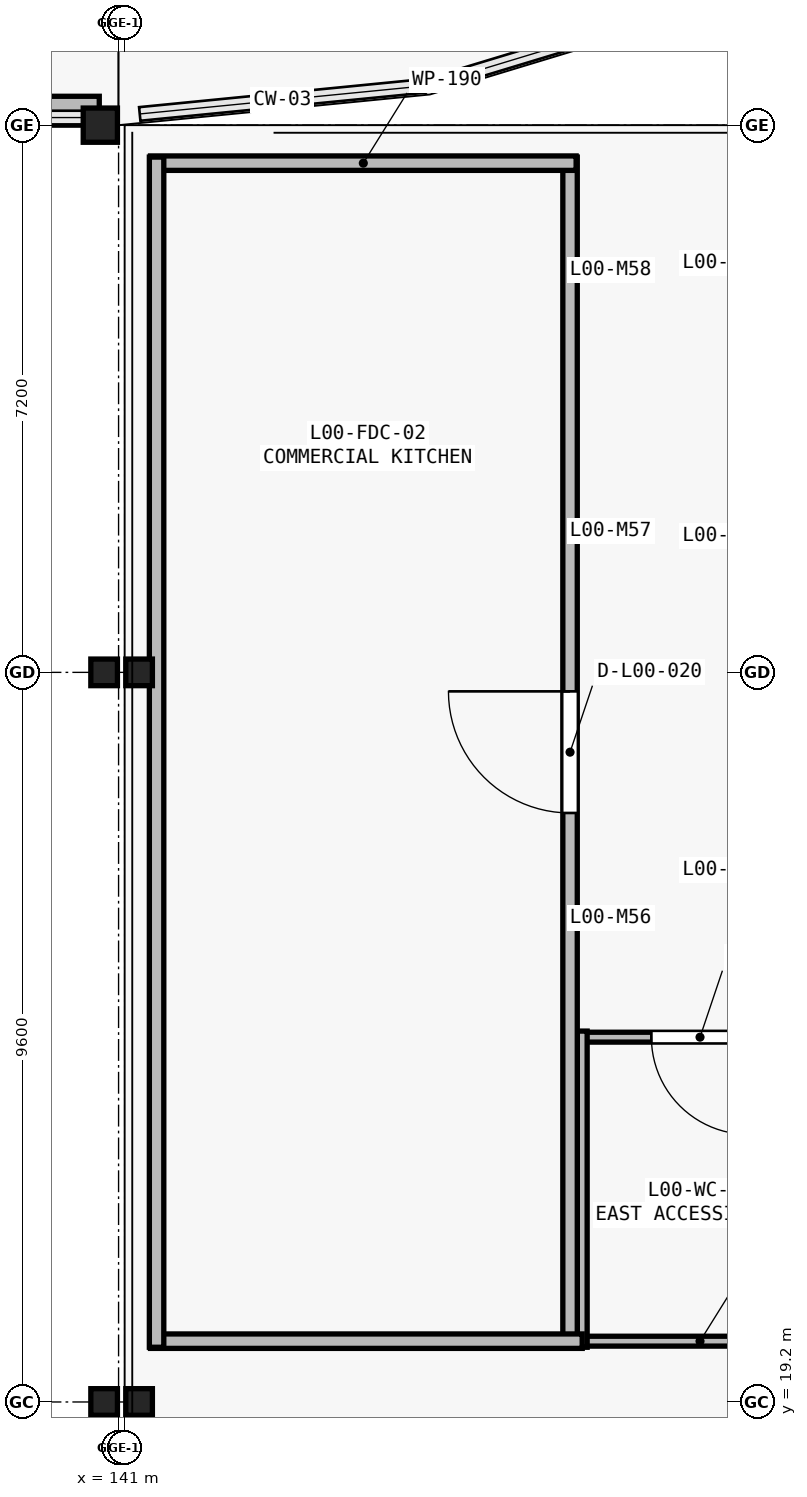
"""IFC4 building model, lengths in metres.
Left out: names, types, materials, properties, quantities, classifications, styles, units other than length and angle.
Written with IfcOpenShell. Run it as: python <this file> out.ifc"""

import sys

from ifc_helpers import new_model, si_unit, direction, frame, frame_2d, origin, origin_2d, place, context, subcontext, project, spatial, rectangle, i_section, extrude, element, fill, save


model = new_model("IFC4")
c1 = context("Model", 3, precision=1e-05, world=origin(), true_north=direction((0.0, 1.0)))
c2 = subcontext(c1, "Body", "Model", "MODEL_VIEW")
j1 = project(units=[si_unit("LENGTHUNIT", "METRE"), si_unit("PLANEANGLEUNIT", "RADIAN")], contexts=[c1])
p1 = place(None, origin())
s1 = spatial("IfcSite", under=j1, at=p1, CompositionType="ELEMENT")
p2 = place(p1, origin())
s2 = spatial("IfcBuilding", under=s1, at=p2, CompositionType="ELEMENT")
p3 = place(p2, origin())
s3 = spatial("IfcBuildingStorey", under=s2, at=p3, CompositionType="ELEMENT", Elevation=0.0)
for number, where, z_axis, x_axis in (
    (1, (140.81, 19.2, 0.0), (0.0, 0.0, 1.0), (1.0, 0.0, 0.0)),
    (2, (140.81, 28.8, 0.0), (0.0, 0.0, 1.0), (1.0, 0.0, 0.0)),
):
    element("IfcColumn", number, at=place(p3, frame(where, z_axis=z_axis, x_axis=x_axis)), inside=s3, PredefinedType="COLUMN", context=c2, shape_type="SweptSolid", body=[
        extrude(i_section(OverallWidth=0.35, OverallDepth=0.35, WebThickness=0.012, FlangeThickness=0.019, FilletRadius=0.02, at=origin_2d()), origin(), (0.0, 0.0, 1.0), 6.0),
    ])
p4 = place(p3, frame((140.76, 36.0, 0.0), z_axis=(0.0, 0.0, 1.0), x_axis=(1.0, 0.0, 0.0)))
e3 = element("IfcColumn", 3, at=p4, inside=s3, PredefinedType="COLUMN", context=c2, shape_type="SweptSolid", body=[
    extrude(i_section(OverallWidth=0.45, OverallDepth=0.45, WebThickness=0.014, FlangeThickness=0.024, FilletRadius=0.024, at=origin_2d()), origin(), (0.0, 0.0, 1.0), 6.0),
])
for number, where, z_axis, x_axis in (
    (4, (141.27, 19.2, 0.0), (0.0, 0.0, 1.0), (1.0, 0.0, 0.0)),
    (5, (141.27, 28.8, 0.0), (0.0, 0.0, 1.0), (1.0, 0.0, 0.0)),
):
    element("IfcColumn", number, at=place(p3, frame(where, z_axis=z_axis, x_axis=x_axis)), inside=s3, PredefinedType="COLUMN", context=c2, shape_type="SweptSolid", body=[
        extrude(i_section(OverallWidth=0.35, OverallDepth=0.35, WebThickness=0.012, FlangeThickness=0.019, FilletRadius=0.02, at=origin_2d()), origin(), (0.0, 0.0, 1.0), 6.0),
    ])
p5 = place(p3, frame((140.746, 36.19, 0.0), z_axis=(0.0, 0.0, 1.0), x_axis=(-1.0, 0.0, 0.0)))
e6 = element("IfcWall", 6, at=p5, inside=s3, PredefinedType="SOLIDWALL", context=c2, shape_type="SweptSolid", body=[
    extrude(rectangle(XDim=9.332, YDim=0.38, at=frame_2d((4.666, 0.0))), origin(), (0.0, 0.0, 1.0), 3.2),
])
p6 = place(p5, frame((3.646, 0.0, 0.0)))
e7 = element("IfcOpeningElement", 7, at=p6, cuts=e6, PredefinedType="OPENING", context=c2, shape_type="SweptSolid", body=[
    extrude(rectangle(XDim=2.0, YDim=2.2, at=frame_2d((1.0, 1.1))), frame((0.0, 0.2, 0.0), z_axis=(0.0, -1.0, 0.0), x_axis=(1.0, 0.0, 0.0)), (0.0, 0.0, 1.0), 0.4),
])
p7 = place(p5, frame((0.846, 0.0, 0.85)))
e8 = element("IfcOpeningElement", 8, at=p7, cuts=e6, PredefinedType="OPENING", context=c2, shape_type="SweptSolid", body=[
    extrude(rectangle(XDim=1.5, YDim=1.8, at=frame_2d((0.75, 0.9))), frame((0.0, 0.2, 0.0), z_axis=(0.0, -1.0, 0.0), x_axis=(1.0, 0.0, 0.0)), (0.0, 0.0, 1.0), 0.4),
])
p8 = place(p3, frame((150.28, 24.0, 0.0), z_axis=(0.0, 0.0, 1.0), x_axis=(-1.0, 0.0, 0.0)))
e9 = element("IfcWall", 9, at=p8, inside=s3, PredefinedType="PARTITIONING", context=c2, shape_type="SweptSolid", body=[
    extrude(rectangle(XDim=3.26, YDim=0.13, at=frame_2d((1.63, 0.0))), origin(), (0.0, 0.0, 1.0), 5.52),
])
p9 = place(p8, frame((0.99, 0.0, 0.0)))
e10 = element("IfcOpeningElement", 10, at=p9, cuts=e9, PredefinedType="OPENING", context=c2, shape_type="SweptSolid", body=[
    extrude(rectangle(XDim=1.28, YDim=2.28, at=frame_2d((0.64, 1.14))), frame((0.0, 0.075, 0.0), z_axis=(0.0, -1.0, 0.0), x_axis=(1.0, 0.0, 0.0)), (0.0, 0.0, 1.0), 0.15),
])
p10 = place(p3, frame((147.02, 20.0, 0.0), z_axis=(0.0, 0.0, 1.0), x_axis=(1.0, 0.0, 0.0)))
e11 = element("IfcWall", 11, at=p10, inside=s3, PredefinedType="PARTITIONING", context=c2, shape_type="SweptSolid", body=[
    extrude(rectangle(XDim=3.26, YDim=0.13, at=frame_2d((1.63, 0.0))), origin(), (0.0, 0.0, 1.0), 5.52),
])
p11 = place(p3, frame((147.1, 24.08, 0.0), z_axis=(0.0, 0.0, 1.0), x_axis=(0.0, -1.0, 0.0)))
e12 = element("IfcWall", 12, at=p11, inside=s3, PredefinedType="PARTITIONING", context=c2, shape_type="SweptSolid", body=[
    extrude(rectangle(XDim=4.16, YDim=0.13, at=frame_2d((2.08, 0.0))), origin(), (0.0, 0.0, 1.0), 5.365),
])
p12 = place(p3, frame((146.94, 19.92, 0.0), z_axis=(0.0, 0.0, 1.0), x_axis=(0.0, 1.0, 0.0)))
e13 = element("IfcWall", 13, at=p12, inside=s3, PredefinedType="PARTITIONING", context=c2, shape_type="SweptSolid", body=[
    extrude(rectangle(XDim=15.66, YDim=0.19, at=frame_2d((7.83, 0.0))), origin(), (0.0, 0.0, 1.0), 5.365),
])
p13 = place(p12, frame((7.03, 0.0, 0.0)))
e14 = element("IfcOpeningElement", 14, at=p13, cuts=e13, PredefinedType="OPENING", context=c2, shape_type="SweptSolid", body=[
    extrude(rectangle(XDim=1.6, YDim=2.2, at=frame_2d((0.8, 1.1))), frame((0.0, 0.105, 0.0), z_axis=(0.0, -1.0, 0.0), x_axis=(1.0, 0.0, 0.0)), (0.0, 0.0, 1.0), 0.21),
])
p14 = place(p3, frame((147.02, 35.5, 0.0), z_axis=(0.0, 0.0, 1.0), x_axis=(-1.0, 0.0, 0.0)))
e15 = element("IfcWall", 15, at=p14, inside=s3, PredefinedType="PARTITIONING", context=c2, shape_type="SweptSolid", body=[
    extrude(rectangle(XDim=5.6, YDim=0.19, at=frame_2d((2.8, 0.0))), origin(), (0.0, 0.0, 1.0), 5.52),
])
p15 = place(p3, frame((141.42, 20.0, 0.0), z_axis=(0.0, 0.0, 1.0), x_axis=(1.0, 0.0, 0.0)))
e16 = element("IfcWall", 16, at=p15, inside=s3, PredefinedType="PARTITIONING", context=c2, shape_type="SweptSolid", body=[
    extrude(rectangle(XDim=5.68, YDim=0.19, at=frame_2d((2.84, 0.0))), origin(), (0.0, 0.0, 1.0), 5.52),
])
p16 = place(p3, frame((141.5, 35.58, 0.0), z_axis=(0.0, 0.0, 1.0), x_axis=(0.0, -1.0, 0.0)))
e17 = element("IfcWall", 17, at=p16, inside=s3, PredefinedType="PARTITIONING", context=c2, shape_type="SweptSolid", body=[
    extrude(rectangle(XDim=15.66, YDim=0.19, at=frame_2d((7.83, 0.0))), origin(), (0.0, 0.0, 1.0), 5.215),
])
p17 = place(p9, origin())
e18 = element("IfcDoor", 18, at=p17, inside=s3, OperationType="SINGLE_SWING_LEFT", PredefinedType="DOOR", context=c2, shape_type="SweptSolid", body=[
    extrude(rectangle(XDim=1.28, YDim=2.28, at=frame_2d((0.64, 1.14))), frame((0.0, 0.025, 0.0), z_axis=(0.0, -1.0, 0.0), x_axis=(1.0, 0.0, 0.0)), (0.0, 0.0, 1.0), 0.05),
])
fill(e10, e18)
p18 = place(p13, origin())
e19 = element("IfcDoor", 19, at=p18, inside=s3, OperationType="SINGLE_SWING_RIGHT", PredefinedType="DOOR", context=c2, shape_type="SweptSolid", body=[
    extrude(rectangle(XDim=1.6, YDim=2.2, at=frame_2d((0.8, 1.1))), frame((0.0, 0.025, 0.0), z_axis=(0.0, -1.0, 0.0), x_axis=(1.0, 0.0, 0.0)), (0.0, 0.0, 1.0), 0.05),
])
fill(e14, e19)
save(model, sys.argv[1])
